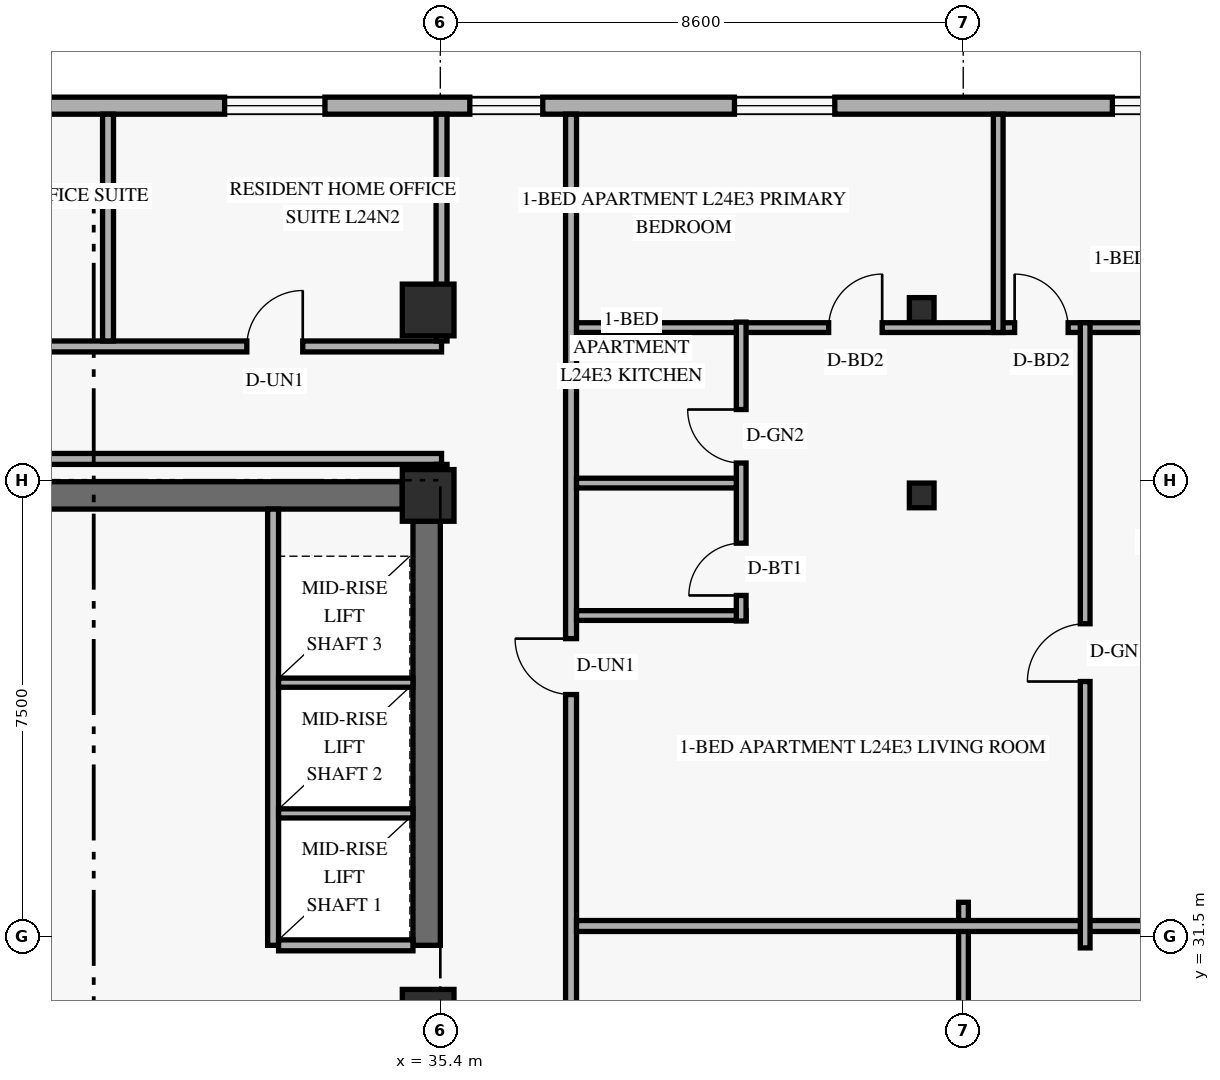
"""IFC4 building model, lengths in metres.
Left out: names, types, materials, properties, quantities, classifications, styles, units other than length and angle.
Written with IfcOpenShell. Run it as: python <this file> out.ifc"""

import sys

from ifc_helpers import new_model, si_unit, direction, frame, frame_2d, origin, origin_2d, place, context, subcontext, project, spatial, rectangle, hollow_rectangle, extrude, element, fill, save


model = new_model("IFC4")
c1 = context("Model", 3, precision=1e-05, world=origin(), true_north=direction((0.0, 1.0)))
c2 = subcontext(c1, "Body", "Model", "MODEL_VIEW")
j1 = project(units=[si_unit("LENGTHUNIT", "METRE"), si_unit("PLANEANGLEUNIT", "RADIAN")], contexts=[c1])
p1 = place(None, origin())
s1 = spatial("IfcSite", under=j1, at=p1, CompositionType="ELEMENT")
p2 = place(p1, origin())
s2 = spatial("IfcBuilding", under=s1, at=p2, CompositionType="ELEMENT")
p3 = place(p2, frame((0.0, 0.0, 94.8)))
s3 = spatial("IfcBuildingStorey", under=s2, at=p3, CompositionType="ELEMENT", Elevation=94.8)
p4 = place(p3, frame((35.175, 31.35, 0.0), z_axis=(0.0, 0.0, 1.0), x_axis=(0.0, 1.0, 0.0)))
e1 = element("IfcWall", 1, at=p4, inside=s3, PredefinedType="SHEAR", context=c2, shape_type="SweptSolid", body=[
    extrude(rectangle(XDim=6.975, YDim=0.45, at=frame_2d((3.487, 0.0))), origin(), (0.0, 0.0, 1.0), 2.739),
])
p5 = place(p3, frame((24.625, 38.75, 0.0), z_axis=(0.0, 0.0, 1.0), x_axis=(1.0, 0.0, 0.0)))
e2 = element("IfcWall", 2, at=p5, inside=s3, PredefinedType="SHEAR", context=c2, shape_type="SweptSolid", body=[
    extrude(rectangle(XDim=10.15, YDim=0.45, at=frame_2d((5.075, 0.0))), origin(), (0.0, 0.0, 1.0), 3.35),
])
for number, where, z_axis, x_axis in (
    (3, (35.2, 30.2, 0.0), (0.0, 0.0, 1.0), (1.0, 0.0, 0.0)),
    (4, (35.2, 38.75, 0.0), (0.0, 0.0, 1.0), (1.0, 0.0, 0.0)),
    (5, (35.2, 41.8, 0.0), (0.0, 0.0, 1.0), (1.0, 0.0, 0.0)),
):
    element("IfcColumn", number, at=place(p3, frame(where, z_axis=z_axis, x_axis=x_axis)), inside=s3, PredefinedType="COLUMN", context=c2, shape_type="SweptSolid", body=[
        extrude(rectangle(XDim=0.85, YDim=0.85, at=origin_2d()), origin(), (0.0, 0.0, 1.0), 3.6),
    ])
for number, where, z_axis, x_axis in (
    (6, (43.254, 38.75, 0.0), (0.035, 0.0, 0.999), (0.0, 1.0, 0.0)),
    (7, (43.254, 41.8, 0.0), (0.035, 0.0, 0.999), (0.0, 1.0, 0.0)),
):
    element("IfcColumn", number, at=place(p3, frame(where, z_axis=z_axis, x_axis=x_axis)), inside=s3, PredefinedType="COLUMN", context=c2, shape_type="SweptSolid", body=[
        extrude(hollow_rectangle(XDim=0.406, YDim=0.406, WallThickness=0.016, at=origin_2d()), origin(), (0.0, 0.0, 1.0), 3.602),
    ])
p6 = place(p3, frame((49.98, 45.16, 0.0), z_axis=(0.0, 0.0, 1.0), x_axis=(-1.0, 0.0, 0.0)))
e8 = element("IfcWall", 8, at=p6, inside=s3, PredefinedType="SOLIDWALL", context=c2, shape_type="SweptSolid", body=[
    extrude(rectangle(XDim=36.56, YDim=0.28, at=frame_2d((18.28, 0.0))), origin(), (0.0, 0.0, 1.0), 3.35),
])
p7 = place(p6, frame((31.62, 0.0, 0.85)))
e9 = element("IfcOpeningElement", 9, at=p7, cuts=e8, PredefinedType="OPENING", context=c2, shape_type="SweptSolid", body=[
    extrude(rectangle(XDim=1.65, YDim=1.6, at=frame_2d((0.825, 0.8))), frame((0.0, 0.15, 0.0), z_axis=(0.0, -1.0, 0.0), x_axis=(1.0, 0.0, 0.0)), (0.0, 0.0, 1.0), 0.3),
])
p8 = place(p6, frame((26.68, 0.0, 0.85)))
e10 = element("IfcOpeningElement", 10, at=p8, cuts=e8, PredefinedType="OPENING", context=c2, shape_type="SweptSolid", body=[
    extrude(rectangle(XDim=1.2, YDim=1.5, at=frame_2d((0.6, 0.75))), frame((0.0, 0.15, 0.0), z_axis=(0.0, -1.0, 0.0), x_axis=(1.0, 0.0, 0.0)), (0.0, 0.0, 1.0), 0.3),
])
p9 = place(p6, frame((22.312, 0.0, 0.85)))
e11 = element("IfcOpeningElement", 11, at=p9, cuts=e8, PredefinedType="OPENING", context=c2, shape_type="SweptSolid", body=[
    extrude(rectangle(XDim=1.65, YDim=1.6, at=frame_2d((0.825, 0.8))), frame((0.0, 0.15, 0.0), z_axis=(0.0, -1.0, 0.0), x_axis=(1.0, 0.0, 0.0)), (0.0, 0.0, 1.0), 0.3),
])
p10 = place(p6, frame((16.477, 0.0, 0.85)))
e12 = element("IfcOpeningElement", 12, at=p10, cuts=e8, PredefinedType="OPENING", context=c2, shape_type="SweptSolid", body=[
    extrude(rectangle(XDim=1.65, YDim=1.6, at=frame_2d((0.825, 0.8))), frame((0.0, 0.15, 0.0), z_axis=(0.0, -1.0, 0.0), x_axis=(1.0, 0.0, 0.0)), (0.0, 0.0, 1.0), 0.3),
])
p11 = place(p6, frame((12.895, 0.0, 0.85)))
e13 = element("IfcOpeningElement", 13, at=p11, cuts=e8, PredefinedType="OPENING", context=c2, shape_type="SweptSolid", body=[
    extrude(rectangle(XDim=1.2, YDim=1.5, at=frame_2d((0.6, 0.75))), frame((0.0, 0.15, 0.0), z_axis=(0.0, -1.0, 0.0), x_axis=(1.0, 0.0, 0.0)), (0.0, 0.0, 1.0), 0.3),
])
p12 = place(p6, frame((8.092, 0.0, 0.85)))
e14 = element("IfcOpeningElement", 14, at=p12, cuts=e8, PredefinedType="OPENING", context=c2, shape_type="SweptSolid", body=[
    extrude(rectangle(XDim=1.65, YDim=1.6, at=frame_2d((0.825, 0.8))), frame((0.0, 0.15, 0.0), z_axis=(0.0, -1.0, 0.0), x_axis=(1.0, 0.0, 0.0)), (0.0, 0.0, 1.0), 0.3),
])
p13 = place(p6, frame((1.877, 0.0, 0.85)))
e15 = element("IfcOpeningElement", 15, at=p13, cuts=e8, PredefinedType="OPENING", context=c2, shape_type="SweptSolid", body=[
    extrude(rectangle(XDim=1.65, YDim=1.6, at=frame_2d((0.825, 0.8))), frame((0.0, 0.15, 0.0), z_axis=(0.0, -1.0, 0.0), x_axis=(1.0, 0.0, 0.0)), (0.0, 0.0, 1.0), 0.3),
])
p14 = place(p3, frame((32.65, 31.35, 0.0), z_axis=(0.0, 0.0, 1.0), x_axis=(0.0, 1.0, 0.0)))
e16 = element("IfcWall", 16, at=p14, inside=s3, PredefinedType="STANDARD", context=c2, shape_type="SweptSolid", body=[
    extrude(rectangle(XDim=7.175, YDim=0.18, at=frame_2d((3.587, 0.0))), origin(), (0.0, 0.0, 1.0), 3.35),
])
p15 = place(p3, frame((32.74, 31.35, 0.0), z_axis=(0.0, 0.0, 1.0), x_axis=(1.0, 0.0, 0.0)))
e17 = element("IfcWall", 17, at=p15, inside=s3, PredefinedType="STANDARD", context=c2, shape_type="SweptSolid", body=[
    extrude(rectangle(XDim=2.21, YDim=0.18, at=frame_2d((1.105, 0.0))), origin(), (0.0, 0.0, 1.0), 3.35),
])
for number, where, z_axis, x_axis in (
    (18, (32.74, 33.52, 0.0), (0.0, 0.0, 1.0), (1.0, 0.0, 0.0)),
    (19, (32.74, 35.67, 0.0), (0.0, 0.0, 1.0), (1.0, 0.0, 0.0)),
):
    element("IfcWall", number, at=place(p3, frame(where, z_axis=z_axis, x_axis=x_axis)), inside=s3, PredefinedType="STANDARD", context=c2, shape_type="SweptSolid", body=[
        extrude(rectangle(XDim=2.21, YDim=0.15, at=frame_2d((1.105, 0.0))), origin(), (0.0, 0.0, 1.0), 3.35),
    ])
p16 = place(p3, frame((37.55, 2.98, 0.0), z_axis=(0.0, 0.0, 1.0), x_axis=(0.0, 1.0, 0.0)))
e20 = element("IfcWall", 20, at=p16, inside=s3, PredefinedType="STANDARD", context=c2, shape_type="SweptSolid", body=[
    extrude(rectangle(XDim=42.04, YDim=0.18, at=frame_2d((21.02, 0.0))), origin(), (0.0, 0.0, 1.0), 2.721),
])
p17 = place(p16, frame((8.264, 0.0, 0.0)))
e21 = element("IfcOpeningElement", 21, at=p17, cuts=e20, PredefinedType="OPENING", context=c2, shape_type="SweptSolid", body=[
    extrude(rectangle(XDim=0.92, YDim=2.15, at=frame_2d((0.46, 1.075))), frame((0.0, 0.1, 0.0), z_axis=(0.0, -1.0, 0.0), x_axis=(1.0, 0.0, 0.0)), (0.0, 0.0, 1.0), 0.2),
])
p18 = place(p16, frame((18.691, 0.0, 0.0)))
e22 = element("IfcOpeningElement", 22, at=p18, cuts=e20, PredefinedType="OPENING", context=c2, shape_type="SweptSolid", body=[
    extrude(rectangle(XDim=0.92, YDim=2.15, at=frame_2d((0.46, 1.075))), frame((0.0, 0.1, 0.0), z_axis=(0.0, -1.0, 0.0), x_axis=(1.0, 0.0, 0.0)), (0.0, 0.0, 1.0), 0.2),
])
p19 = place(p16, frame((32.494, 0.0, 0.0)))
e23 = element("IfcOpeningElement", 23, at=p19, cuts=e20, PredefinedType="OPENING", context=c2, shape_type="SweptSolid", body=[
    extrude(rectangle(XDim=0.92, YDim=2.15, at=frame_2d((0.46, 1.075))), frame((0.0, 0.1, 0.0), z_axis=(0.0, -1.0, 0.0), x_axis=(1.0, 0.0, 0.0)), (0.0, 0.0, 1.0), 0.2),
])
p20 = place(p3, frame((23.75, 41.2, 0.0), z_axis=(0.0, 0.0, 1.0), x_axis=(1.0, 0.0, 0.0)))
e24 = element("IfcWall", 24, at=p20, inside=s3, PredefinedType="STANDARD", context=c2, shape_type="SweptSolid", body=[
    extrude(rectangle(XDim=11.67, YDim=0.18, at=frame_2d((5.835, 0.0))), origin(), (0.0, 0.0, 1.0), 2.721),
])
p21 = place(p20, frame((2.633, 0.0, 0.0)))
e25 = element("IfcOpeningElement", 25, at=p21, cuts=e24, PredefinedType="OPENING", context=c2, shape_type="SweptSolid", body=[
    extrude(rectangle(XDim=0.92, YDim=2.15, at=frame_2d((0.46, 1.075))), frame((0.0, 0.1, 0.0), z_axis=(0.0, -1.0, 0.0), x_axis=(1.0, 0.0, 0.0)), (0.0, 0.0, 1.0), 0.2),
])
p22 = place(p20, frame((8.468, 0.0, 0.0)))
e26 = element("IfcOpeningElement", 26, at=p22, cuts=e24, PredefinedType="OPENING", context=c2, shape_type="SweptSolid", body=[
    extrude(rectangle(XDim=0.92, YDim=2.15, at=frame_2d((0.46, 1.075))), frame((0.0, 0.1, 0.0), z_axis=(0.0, -1.0, 0.0), x_axis=(1.0, 0.0, 0.0)), (0.0, 0.0, 1.0), 0.2),
])
p23 = place(p3, frame((23.75, 39.35, 0.0), z_axis=(0.0, 0.0, 1.0), x_axis=(1.0, 0.0, 0.0)))
e27 = element("IfcWall", 27, at=p23, inside=s3, PredefinedType="STANDARD", context=c2, shape_type="SweptSolid", body=[
    extrude(rectangle(XDim=11.67, YDim=0.18, at=frame_2d((5.835, 0.0))), origin(), (0.0, 0.0, 1.0), 2.721),
])
p24 = place(p3, frame((35.42, 38.75, 0.0), z_axis=(0.0, 0.0, 1.0), x_axis=(0.0, 1.0, 0.0)))
e28 = element("IfcWall", 28, at=p24, inside=s3, PredefinedType="STANDARD", context=c2, shape_type="SweptSolid", body=[
    extrude(rectangle(XDim=0.51, YDim=0.18, at=frame_2d((0.255, 0.0))), origin(), (0.0, 0.0, 1.0), 2.721),
])
p25 = place(p3, frame((35.42, 41.29, 0.0), z_axis=(0.0, 0.0, 1.0), x_axis=(0.0, 1.0, 0.0)))
e29 = element("IfcWall", 29, at=p25, inside=s3, PredefinedType="PARTITIONING", context=c2, shape_type="SweptSolid", body=[
    extrude(rectangle(XDim=3.73, YDim=0.18, at=frame_2d((1.865, 0.0))), origin(), (0.0, 0.0, 1.0), 2.721),
])
p26 = place(p3, frame((44.004, 27.598, 0.0), z_axis=(0.0, 0.0, 1.0), x_axis=(0.0, 1.0, 0.0)))
e30 = element("IfcWall", 30, at=p26, inside=s3, PredefinedType="PARTITIONING", context=c2, shape_type="SweptSolid", body=[
    extrude(rectangle(XDim=4.46, YDim=0.16, at=frame_2d((2.23, 0.0))), origin(), (0.0, 0.0, 1.0), 2.721),
])
p27 = place(p3, frame((37.64, 31.668, 0.0), z_axis=(0.0, 0.0, 1.0), x_axis=(1.0, 0.0, 0.0)))
e31 = element("IfcWall", 31, at=p27, inside=s3, PredefinedType="PARTITIONING", context=c2, shape_type="SweptSolid", body=[
    extrude(rectangle(XDim=15.68, YDim=0.18, at=frame_2d((7.84, 0.0))), origin(), (0.0, 0.0, 1.0), 2.721),
])
p28 = place(p3, frame((37.64, 41.51, 0.0), z_axis=(0.0, 0.0, 1.0), x_axis=(1.0, 0.0, 0.0)))
e32 = element("IfcWall", 32, at=p28, inside=s3, PredefinedType="PARTITIONING", context=c2, shape_type="SweptSolid", body=[
    extrude(rectangle(XDim=15.68, YDim=0.16, at=frame_2d((7.84, 0.0))), origin(), (0.0, 0.0, 1.0), 2.721),
])
p29 = place(p28, frame((4.146, 0.0, 0.0)))
e33 = element("IfcOpeningElement", 33, at=p29, cuts=e32, PredefinedType="OPENING", context=c2, shape_type="SweptSolid", body=[
    extrude(rectangle(XDim=0.88, YDim=2.14, at=frame_2d((0.44, 1.07))), frame((0.0, 0.09, 0.0), z_axis=(0.0, -1.0, 0.0), x_axis=(1.0, 0.0, 0.0)), (0.0, 0.0, 1.0), 0.18),
])
p30 = place(p28, frame((7.205, 0.0, 0.0)))
e34 = element("IfcOpeningElement", 34, at=p30, cuts=e32, PredefinedType="OPENING", context=c2, shape_type="SweptSolid", body=[
    extrude(rectangle(XDim=0.88, YDim=2.14, at=frame_2d((0.44, 1.07))), frame((0.0, 0.09, 0.0), z_axis=(0.0, -1.0, 0.0), x_axis=(1.0, 0.0, 0.0)), (0.0, 0.0, 1.0), 0.18),
])
p31 = place(p3, frame((37.64, 36.774, 0.0), z_axis=(0.0, 0.0, 1.0), x_axis=(1.0, 0.0, 0.0)))
e35 = element("IfcWall", 35, at=p31, inside=s3, PredefinedType="PLUMBINGWALL", context=c2, shape_type="SweptSolid", body=[
    extrude(rectangle(XDim=2.788, YDim=0.16, at=frame_2d((1.394, 0.0))), origin(), (0.0, 0.0, 1.0), 3.35),
])
p32 = place(p3, frame((40.348, 36.685, 0.0), z_axis=(0.0, 0.0, 1.0), x_axis=(0.0, 1.0, 0.0)))
e36 = element("IfcWall", 36, at=p32, inside=s3, PredefinedType="PLUMBINGWALL", context=c2, shape_type="SweptSolid", body=[
    extrude(rectangle(XDim=4.916, YDim=0.16, at=frame_2d((2.458, 0.0))), origin(), (0.0, 0.0, 1.0), 2.721),
])
p33 = place(p32, frame((0.42, 0.0, 0.0)))
e37 = element("IfcOpeningElement", 37, at=p33, cuts=e36, PredefinedType="OPENING", context=c2, shape_type="SweptSolid", body=[
    extrude(rectangle(XDim=0.86, YDim=2.12, at=frame_2d((0.43, 1.06))), frame((0.0, 0.09, 0.0), z_axis=(0.0, -1.0, 0.0), x_axis=(1.0, 0.0, 0.0)), (0.0, 0.0, 1.0), 0.18),
])
p34 = place(p32, frame((2.598, 0.0, 0.0)))
e38 = element("IfcOpeningElement", 38, at=p34, cuts=e36, PredefinedType="OPENING", context=c2, shape_type="SweptSolid", body=[
    extrude(rectangle(XDim=0.88, YDim=2.12, at=frame_2d((0.44, 1.06))), frame((0.0, 0.09, 0.0), z_axis=(0.0, -1.0, 0.0), x_axis=(1.0, 0.0, 0.0)), (0.0, 0.0, 1.0), 0.18),
])
p35 = place(p3, frame((37.64, 38.953, 0.0), z_axis=(0.0, 0.0, 1.0), x_axis=(1.0, 0.0, 0.0)))
e39 = element("IfcWall", 39, at=p35, inside=s3, PredefinedType="PLUMBINGWALL", context=c2, shape_type="SweptSolid", body=[
    extrude(rectangle(XDim=2.628, YDim=0.16, at=frame_2d((1.314, 0.0))), origin(), (0.0, 0.0, 1.0), 2.721),
])
p36 = place(p3, frame((46.005, 31.308, 0.0), z_axis=(0.0, 0.0, 1.0), x_axis=(0.0, 1.0, 0.0)))
e40 = element("IfcWall", 40, at=p36, inside=s3, PredefinedType="PARTITIONING", context=c2, shape_type="SweptSolid", body=[
    extrude(rectangle(XDim=10.282, YDim=0.16, at=frame_2d((5.141, 0.0))), origin(), (0.0, 0.0, 1.0), 2.721),
])
p37 = place(p36, frame((4.381, 0.0, 0.0)))
e41 = element("IfcOpeningElement", 41, at=p37, cuts=e40, PredefinedType="OPENING", context=c2, shape_type="SweptSolid", body=[
    extrude(rectangle(XDim=0.95, YDim=2.15, at=frame_2d((0.475, 1.075))), frame((0.0, 0.09, 0.0), z_axis=(0.0, -1.0, 0.0), x_axis=(1.0, 0.0, 0.0)), (0.0, 0.0, 1.0), 0.18),
])
p38 = place(p3, frame((44.575, 41.43, 0.0), z_axis=(0.0, 0.0, 1.0), x_axis=(0.0, 1.0, 0.0)))
e42 = element("IfcWall", 42, at=p38, inside=s3, PredefinedType="PARTITIONING", context=c2, shape_type="SweptSolid", body=[
    extrude(rectangle(XDim=3.59, YDim=0.16, at=frame_2d((1.795, 0.0))), origin(), (0.0, 0.0, 1.0), 2.799),
])
p39 = place(p3, frame((29.935, 41.29, 0.0), z_axis=(0.0, 0.0, 1.0), x_axis=(0.0, 1.0, 0.0)))
e43 = element("IfcWall", 43, at=p39, inside=s3, PredefinedType="PARTITIONING", context=c2, shape_type="SweptSolid", body=[
    extrude(rectangle(XDim=3.73, YDim=0.18, at=frame_2d((1.865, 0.0))), origin(), (0.0, 0.0, 1.0), 2.799),
])
p40 = place(p10, origin())
e44 = element("IfcWindow", 44, at=p40, inside=s3, PartitioningType="SINGLE_PANEL", PredefinedType="WINDOW", context=c2, shape_type="SweptSolid", body=[
    extrude(rectangle(XDim=1.65, YDim=1.6, at=frame_2d((0.825, 0.8))), frame((0.0, 0.03, 0.0), z_axis=(0.0, -1.0, 0.0), x_axis=(1.0, 0.0, 0.0)), (0.0, 0.0, 1.0), 0.06),
])
fill(e12, e44)
p41 = place(p11, origin())
e45 = element("IfcWindow", 45, at=p41, inside=s3, PartitioningType="SINGLE_PANEL", PredefinedType="WINDOW", context=c2, shape_type="SweptSolid", body=[
    extrude(rectangle(XDim=1.2, YDim=1.5, at=frame_2d((0.6, 0.75))), frame((0.0, 0.03, 0.0), z_axis=(0.0, -1.0, 0.0), x_axis=(1.0, 0.0, 0.0)), (0.0, 0.0, 1.0), 0.06),
])
fill(e13, e45)
p42 = place(p12, origin())
e46 = element("IfcWindow", 46, at=p42, inside=s3, PartitioningType="SINGLE_PANEL", PredefinedType="WINDOW", context=c2, shape_type="SweptSolid", body=[
    extrude(rectangle(XDim=1.65, YDim=1.6, at=frame_2d((0.825, 0.8))), frame((0.0, 0.03, 0.0), z_axis=(0.0, -1.0, 0.0), x_axis=(1.0, 0.0, 0.0)), (0.0, 0.0, 1.0), 0.06),
])
fill(e14, e46)
p43 = place(p13, origin())
e47 = element("IfcWindow", 47, at=p43, inside=s3, PartitioningType="SINGLE_PANEL", PredefinedType="WINDOW", context=c2, shape_type="SweptSolid", body=[
    extrude(rectangle(XDim=1.65, YDim=1.6, at=frame_2d((0.825, 0.8))), frame((0.0, 0.03, 0.0), z_axis=(0.0, -1.0, 0.0), x_axis=(1.0, 0.0, 0.0)), (0.0, 0.0, 1.0), 0.06),
])
fill(e15, e47)
p44 = place(p37, origin())
e48 = element("IfcDoor", 48, at=p44, inside=s3, OperationType="SINGLE_SWING_LEFT", PredefinedType="DOOR", context=c2, shape_type="SweptSolid", body=[
    extrude(rectangle(XDim=0.95, YDim=2.15, at=frame_2d((0.475, 1.075))), frame((0.0, 0.025, 0.0), z_axis=(0.0, -1.0, 0.0), x_axis=(1.0, 0.0, 0.0)), (0.0, 0.0, 1.0), 0.05),
])
fill(e41, e48)
p45 = place(p19, origin())
e49 = element("IfcDoor", 49, at=p45, inside=s3, OperationType="SINGLE_SWING_RIGHT", PredefinedType="DOOR", context=c2, shape_type="SweptSolid", body=[
    extrude(rectangle(XDim=0.92, YDim=2.15, at=frame_2d((0.46, 1.075))), frame((0.0, 0.025, 0.0), z_axis=(0.0, -1.0, 0.0), x_axis=(1.0, 0.0, 0.0)), (0.0, 0.0, 1.0), 0.05),
])
fill(e23, e49)
p46 = place(p33, origin())
e50 = element("IfcDoor", 50, at=p46, inside=s3, OperationType="SINGLE_SWING_LEFT", PredefinedType="DOOR", context=c2, shape_type="SweptSolid", body=[
    extrude(rectangle(XDim=0.86, YDim=2.12, at=frame_2d((0.43, 1.06))), frame((0.0, 0.025, 0.0), z_axis=(0.0, -1.0, 0.0), x_axis=(1.0, 0.0, 0.0)), (0.0, 0.0, 1.0), 0.05),
])
fill(e37, e50)
p47 = place(p34, origin())
e51 = element("IfcDoor", 51, at=p47, inside=s3, OperationType="SINGLE_SWING_RIGHT", PredefinedType="DOOR", context=c2, shape_type="SweptSolid", body=[
    extrude(rectangle(XDim=0.88, YDim=2.12, at=frame_2d((0.44, 1.06))), frame((0.0, 0.025, 0.0), z_axis=(0.0, -1.0, 0.0), x_axis=(1.0, 0.0, 0.0)), (0.0, 0.0, 1.0), 0.05),
])
fill(e38, e51)
p48 = place(p29, origin())
e52 = element("IfcDoor", 52, at=p48, inside=s3, OperationType="SINGLE_SWING_RIGHT", PredefinedType="DOOR", context=c2, shape_type="SweptSolid", body=[
    extrude(rectangle(XDim=0.88, YDim=2.14, at=frame_2d((0.44, 1.07))), frame((0.0, 0.025, 0.0), z_axis=(0.0, -1.0, 0.0), x_axis=(1.0, 0.0, 0.0)), (0.0, 0.0, 1.0), 0.05),
])
fill(e33, e52)
p49 = place(p30, origin())
e53 = element("IfcDoor", 53, at=p49, inside=s3, OperationType="SINGLE_SWING_LEFT", PredefinedType="DOOR", context=c2, shape_type="SweptSolid", body=[
    extrude(rectangle(XDim=0.88, YDim=2.14, at=frame_2d((0.44, 1.07))), frame((0.0, 0.025, 0.0), z_axis=(0.0, -1.0, 0.0), x_axis=(1.0, 0.0, 0.0)), (0.0, 0.0, 1.0), 0.05),
])
fill(e34, e53)
p50 = place(p22, origin())
e54 = element("IfcDoor", 54, at=p50, inside=s3, OperationType="SINGLE_SWING_RIGHT", PredefinedType="DOOR", context=c2, shape_type="SweptSolid", body=[
    extrude(rectangle(XDim=0.92, YDim=2.15, at=frame_2d((0.46, 1.075))), frame((0.0, 0.025, 0.0), z_axis=(0.0, -1.0, 0.0), x_axis=(1.0, 0.0, 0.0)), (0.0, 0.0, 1.0), 0.05),
])
fill(e26, e54)
save(model, sys.argv[1])
